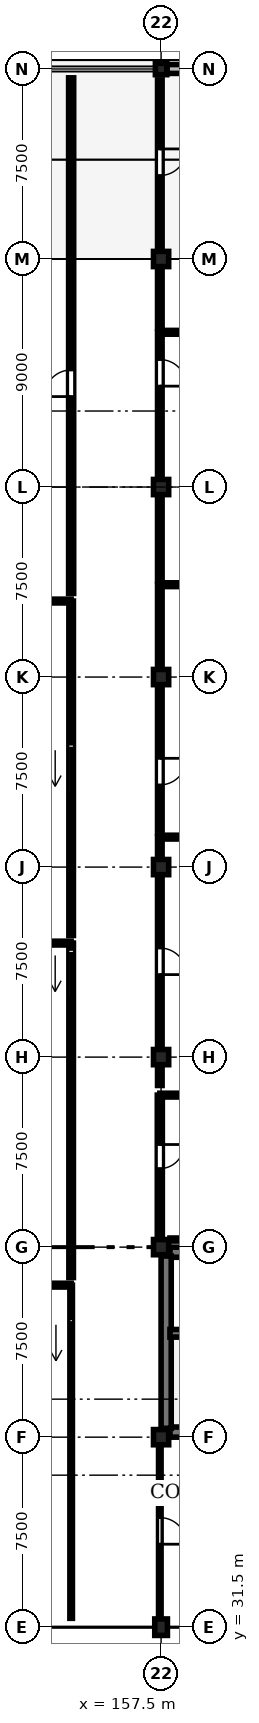
"""IFC4 building model, lengths in metres.
Left out: names, types, materials, properties, quantities, classifications, styles, units other than length and angle.
Written with IfcOpenShell. Run it as: python <this file> out.ifc"""

import sys

from ifc_helpers import new_model, si_unit, direction, frame, frame_2d, origin, origin_2d, place, context, subcontext, project, spatial, rectangle, circle, extrude, element, fill, save


model = new_model("IFC4")
c1 = context("Model", 3, precision=1e-05, world=origin(), true_north=direction((0.0, 1.0)))
c2 = subcontext(c1, "Body", "Model", "MODEL_VIEW")
j1 = project(units=[si_unit("LENGTHUNIT", "METRE"), si_unit("PLANEANGLEUNIT", "RADIAN")], contexts=[c1])
p1 = place(None, origin())
s1 = spatial("IfcSite", under=j1, at=p1, CompositionType="ELEMENT")
p2 = place(p1, origin())
s2 = spatial("IfcBuilding", under=s1, at=p2, CompositionType="ELEMENT")
p3 = place(p2, origin())
s3 = spatial("IfcBuildingStorey", under=s2, at=p3, CompositionType="ELEMENT", Elevation=0.0)
p4 = place(p3, frame((157.5, 31.5, 0.0), z_axis=(0.0, 0.0, 1.0), x_axis=(1.0, 0.0, 0.0)))
e1 = element("IfcColumn", 1, at=p4, inside=s3, PredefinedType="COLUMN", context=c2, shape_type="SweptSolid", body=[
    extrude(rectangle(XDim=0.5, YDim=0.65, at=origin_2d()), origin(), (0.0, 0.0, 1.0), 4.8),
])
p5 = place(p3, frame((157.5, 39.0, 0.0), z_axis=(0.0, 0.0, 1.0), x_axis=(1.0, 0.0, 0.0)))
e2 = element("IfcColumn", 2, at=p5, inside=s3, PredefinedType="COLUMN", context=c2, shape_type="SweptSolid", body=[
    extrude(rectangle(XDim=0.6, YDim=0.6, at=origin_2d()), origin(), (0.0, 0.0, 1.0), 4.8),
])
p6 = place(p3, frame((157.5, 46.5, 0.0), z_axis=(0.0, 0.0, 1.0), x_axis=(1.0, 0.0, 0.0)))
e3 = element("IfcColumn", 3, at=p6, inside=s3, PredefinedType="COLUMN", context=c2, shape_type="SweptSolid", body=[
    extrude(circle(Radius=0.3, at=origin_2d()), origin(), (0.0, 0.0, 1.0), 4.8),
])
for number, where, z_axis, x_axis in (
    (4, (157.5, 54.0, 0.0), (0.0, 0.0, 1.0), (1.0, 0.0, 0.0)),
    (5, (157.5, 61.5, 0.0), (0.0, 0.0, 1.0), (1.0, 0.0, 0.0)),
):
    element("IfcColumn", number, at=place(p3, frame(where, z_axis=z_axis, x_axis=x_axis)), inside=s3, PredefinedType="COLUMN", context=c2, shape_type="SweptSolid", body=[
        extrude(rectangle(XDim=0.6, YDim=0.6, at=origin_2d()), origin(), (0.0, 0.0, 1.0), 4.8),
    ])
p7 = place(p3, frame((157.5, 69.0, 0.0), z_axis=(0.0, 0.0, 1.0), x_axis=(1.0, 0.0, 0.0)))
e6 = element("IfcColumn", 6, at=p7, inside=s3, PredefinedType="COLUMN", context=c2, shape_type="SweptSolid", body=[
    extrude(circle(Radius=0.3, at=origin_2d()), origin(), (0.0, 0.0, 1.0), 4.8),
])
for number, where, z_axis, x_axis in (
    (7, (157.5, 76.5, 0.0), (0.0, 0.0, 1.0), (1.0, 0.0, 0.0)),
    (8, (157.5, 85.5, 0.0), (0.0, 0.0, 1.0), (1.0, 0.0, 0.0)),
):
    element("IfcColumn", number, at=place(p3, frame(where, z_axis=z_axis, x_axis=x_axis)), inside=s3, PredefinedType="COLUMN", context=c2, shape_type="SweptSolid", body=[
        extrude(rectangle(XDim=0.6, YDim=0.6, at=origin_2d()), origin(), (0.0, 0.0, 1.0), 4.8),
    ])
p8 = place(p3, frame((157.5, 93.0, 0.0), z_axis=(0.0, 0.0, 1.0), x_axis=(1.0, 0.0, 0.0)))
e9 = element("IfcColumn", 9, at=p8, inside=s3, PredefinedType="COLUMN", context=c2, shape_type="SweptSolid", body=[
    extrude(rectangle(XDim=0.45, YDim=0.45, at=origin_2d()), origin(), (0.0, 0.0, 1.0), 4.8),
])
p9 = place(p3, frame((157.735, 93.0, 0.0), z_axis=(0.0, 0.0, 1.0), x_axis=(1.0, 0.0, 0.0)))
e10 = element("IfcWall", 10, at=p9, inside=s3, PredefinedType="STANDARD", context=c2, shape_type="SweptSolid", body=[
    extrude(rectangle(XDim=7.03, YDim=0.35, at=frame_2d((3.515, 0.0))), origin(), (0.0, 0.0, 1.0), 4.5),
])
p10 = place(p9, frame((2.765, 0.0, 0.9)))
e11 = element("IfcOpeningElement", 11, at=p10, cuts=e10, PredefinedType="OPENING", context=c2, shape_type="SweptSolid", body=[
    extrude(rectangle(XDim=1.5, YDim=2.4, at=frame_2d((0.75, 1.2))), frame((0.0, 0.185, 0.0), z_axis=(0.0, -1.0, 0.0), x_axis=(1.0, 0.0, 0.0)), (0.0, 0.0, 1.0), 0.37),
])
p11 = place(p3, frame((157.85, 39.2, 0.0), z_axis=(0.0, 0.0, 1.0), x_axis=(1.0, 0.0, 0.0)))
e12 = element("IfcWall", 12, at=p11, inside=s3, PredefinedType="SHEAR", context=c2, shape_type="SweptSolid", body=[
    extrude(rectangle(XDim=8.05, YDim=0.4, at=frame_2d((4.025, 0.0))), origin(), (0.0, 0.0, 1.0), 4.5),
])
p12 = place(p3, frame((157.85, 46.3, 0.0), z_axis=(0.0, 0.0, 1.0), x_axis=(1.0, 0.0, 0.0)))
e13 = element("IfcWall", 13, at=p12, inside=s3, PredefinedType="SHEAR", context=c2, shape_type="SweptSolid", body=[
    extrude(rectangle(XDim=14.3, YDim=0.4, at=frame_2d((7.15, 0.0))), origin(), (0.0, 0.0, 1.0), 4.5),
])
p13 = place(p3, frame((157.7, 39.35, 0.0), z_axis=(0.0, 0.0, 1.0), x_axis=(0.0, 1.0, 0.0)))
e14 = element("IfcWall", 14, at=p13, inside=s3, PredefinedType="SHEAR", context=c2, shape_type="SweptSolid", body=[
    extrude(rectangle(XDim=6.8, YDim=0.4, at=frame_2d((3.4, 0.0))), origin(), (0.0, 0.0, 1.0), 4.5),
])
p14 = place(p3, frame((157.85, 43.1, 0.0), z_axis=(0.0, 0.0, 1.0), x_axis=(1.0, 0.0, 0.0)))
e15 = element("IfcWall", 15, at=p14, inside=s3, PredefinedType="SHEAR", context=c2, shape_type="SweptSolid", body=[
    extrude(rectangle(XDim=8.05, YDim=0.3, at=frame_2d((4.025, 0.0))), origin(), (0.0, 0.0, 1.0), 4.5),
])
p15 = place(p3, frame((153.95, 31.85, 0.0), z_axis=(0.0, 0.0, 1.0), x_axis=(0.0, 1.0, 0.0)))
e16 = element("IfcWall", 16, at=p15, inside=s3, PredefinedType="PARTITIONING", context=c2, shape_type="SweptSolid", body=[
    extrude(rectangle(XDim=13.15, YDim=0.1, at=frame_2d((6.575, 0.0))), origin(), (0.0, 0.0, 1.0), 4.485),
])
p16 = place(p15, frame((9.925, 0.0, 0.0)))
e17 = element("IfcOpeningElement", 17, at=p16, cuts=e16, PredefinedType="OPENING", context=c2, shape_type="SweptSolid", body=[
    extrude(rectangle(XDim=1.9, YDim=2.45, at=frame_2d((0.95, 1.225))), frame((0.0, 0.06, 0.0), z_axis=(0.0, -1.0, 0.0), x_axis=(1.0, 0.0, 0.0)), (0.0, 0.0, 1.0), 0.12),
])
p17 = place(p3, frame((153.95, 45.3, 0.0), z_axis=(0.0, 0.0, 1.0), x_axis=(0.0, 1.0, 0.0)))
e18 = element("IfcWall", 18, at=p17, inside=s3, PredefinedType="PARTITIONING", context=c2, shape_type="SweptSolid", body=[
    extrude(rectangle(XDim=13.2, YDim=0.18, at=frame_2d((6.6, 0.0))), origin(), (0.0, 0.0, 1.0), 4.485),
])
p18 = place(p17, frame((11.05, 0.0, 0.0)))
e19 = element("IfcOpeningElement", 19, at=p18, cuts=e18, PredefinedType="OPENING", context=c2, shape_type="SweptSolid", body=[
    extrude(rectangle(XDim=1.9, YDim=2.45, at=frame_2d((0.95, 1.225))), frame((0.0, 0.1, 0.0), z_axis=(0.0, -1.0, 0.0), x_axis=(1.0, 0.0, 0.0)), (0.0, 0.0, 1.0), 0.2),
])
p19 = place(p3, frame((153.95, 58.8, 0.0), z_axis=(0.0, 0.0, 1.0), x_axis=(0.0, 1.0, 0.0)))
e20 = element("IfcWall", 20, at=p19, inside=s3, PredefinedType="PARTITIONING", context=c2, shape_type="SweptSolid", body=[
    extrude(rectangle(XDim=13.2, YDim=0.18, at=frame_2d((6.6, 0.0))), origin(), (0.0, 0.0, 1.0), 4.485),
])
p20 = place(p19, frame((5.65, 0.0, 0.0)))
e21 = element("IfcOpeningElement", 21, at=p20, cuts=e20, PredefinedType="OPENING", context=c2, shape_type="SweptSolid", body=[
    extrude(rectangle(XDim=1.9, YDim=2.45, at=frame_2d((0.95, 1.225))), frame((0.0, 0.1, 0.0), z_axis=(0.0, -1.0, 0.0), x_axis=(1.0, 0.0, 0.0)), (0.0, 0.0, 1.0), 0.2),
])
p21 = place(p3, frame((153.95, 72.3, 0.0), z_axis=(0.0, 0.0, 1.0), x_axis=(0.0, 1.0, 0.0)))
e22 = element("IfcWall", 22, at=p21, inside=s3, PredefinedType="STANDARD", context=c2, shape_type="SweptSolid", body=[
    extrude(rectangle(XDim=20.35, YDim=0.2, at=frame_2d((10.175, 0.0))), origin(), (0.0, 0.0, 1.0), 4.085),
])
p22 = place(p21, frame((7.77, 0.0, 0.0)))
e23 = element("IfcOpeningElement", 23, at=p22, cuts=e22, PredefinedType="OPENING", context=c2, shape_type="SweptSolid", body=[
    extrude(rectangle(XDim=1.05, YDim=2.2, at=frame_2d((0.525, 1.1))), frame((0.0, 0.11, 0.0), z_axis=(0.0, -1.0, 0.0), x_axis=(1.0, 0.0, 0.0)), (0.0, 0.0, 1.0), 0.22),
])
p23 = place(p3, frame((157.45, 38.75, 0.0), z_axis=(0.0, 0.0, 1.0), x_axis=(0.0, -1.0, 0.0)))
e24 = element("IfcWall", 24, at=p23, inside=s3, PredefinedType="PARTITIONING", context=c2, shape_type="SweptSolid", body=[
    extrude(rectangle(XDim=6.9, YDim=0.1, at=frame_2d((3.45, 0.0))), origin(), (0.0, 0.0, 1.0), 3.985),
])
p24 = place(p23, frame((2.925, 0.0, 0.0)))
e25 = element("IfcOpeningElement", 25, at=p24, cuts=e24, PredefinedType="OPENING", context=c2, shape_type="SweptSolid", body=[
    extrude(rectangle(XDim=1.05, YDim=2.2, at=frame_2d((0.525, 1.1))), frame((0.0, 0.06, 0.0), z_axis=(0.0, -1.0, 0.0), x_axis=(1.0, 0.0, 0.0)), (0.0, 0.0, 1.0), 0.12),
])
p25 = place(p3, frame((157.45, 52.5, 0.0), z_axis=(0.0, 0.0, 1.0), x_axis=(0.0, -1.0, 0.0)))
e26 = element("IfcWall", 26, at=p25, inside=s3, PredefinedType="STANDARD", context=c2, shape_type="SweptSolid", body=[
    extrude(rectangle(XDim=5.7, YDim=0.2, at=frame_2d((2.85, 0.0))), origin(), (0.0, 0.0, 1.0), 3.985),
])
p26 = place(p25, frame((1.95, 0.0, 0.0)))
e27 = element("IfcOpeningElement", 27, at=p26, cuts=e26, PredefinedType="OPENING", context=c2, shape_type="SweptSolid", body=[
    extrude(rectangle(XDim=0.95, YDim=2.15, at=frame_2d((0.475, 1.075))), frame((0.0, 0.11, 0.0), z_axis=(0.0, -1.0, 0.0), x_axis=(1.0, 0.0, 0.0)), (0.0, 0.0, 1.0), 0.22),
])
p27 = place(p3, frame((157.45, 62.683, 0.0), z_axis=(0.0, 0.0, 1.0), x_axis=(0.0, -1.0, 0.0)))
e28 = element("IfcWall", 28, at=p27, inside=s3, PredefinedType="PARTITIONING", context=c2, shape_type="SweptSolid", body=[
    extrude(rectangle(XDim=9.803, YDim=0.18, at=frame_2d((4.901, 0.0))), origin(), (0.0, 0.0, 1.0), 3.935),
])
p28 = place(p27, frame((4.376, 0.0, 0.0)))
e29 = element("IfcOpeningElement", 29, at=p28, cuts=e28, PredefinedType="OPENING", context=c2, shape_type="SweptSolid", body=[
    extrude(rectangle(XDim=1.05, YDim=2.2, at=frame_2d((0.525, 1.1))), frame((0.0, 0.1, 0.0), z_axis=(0.0, -1.0, 0.0), x_axis=(1.0, 0.0, 0.0)), (0.0, 0.0, 1.0), 0.2),
])
p29 = place(p3, frame((157.45, 72.645, 0.0), z_axis=(0.0, 0.0, 1.0), x_axis=(0.0, -1.0, 0.0)))
e30 = element("IfcWall", 30, at=p29, inside=s3, PredefinedType="PARTITIONING", context=c2, shape_type="SweptSolid", body=[
    extrude(rectangle(XDim=9.802, YDim=0.18, at=frame_2d((4.901, 0.0))), origin(), (0.0, 0.0, 1.0), 3.935),
])
p30 = place(p29, frame((6.852, 0.0, 0.0)))
e31 = element("IfcOpeningElement", 31, at=p30, cuts=e30, PredefinedType="OPENING", context=c2, shape_type="SweptSolid", body=[
    extrude(rectangle(XDim=1.05, YDim=2.2, at=frame_2d((0.525, 1.1))), frame((0.0, 0.1, 0.0), z_axis=(0.0, -1.0, 0.0), x_axis=(1.0, 0.0, 0.0)), (0.0, 0.0, 1.0), 0.2),
])
p31 = place(p3, frame((157.45, 82.607, 0.0), z_axis=(0.0, 0.0, 1.0), x_axis=(0.0, -1.0, 0.0)))
e32 = element("IfcWall", 32, at=p31, inside=s3, PredefinedType="PARTITIONING", context=c2, shape_type="SweptSolid", body=[
    extrude(rectangle(XDim=9.802, YDim=0.18, at=frame_2d((4.901, 0.0))), origin(), (0.0, 0.0, 1.0), 3.785),
])
p32 = place(p31, frame((1.075, 0.0, 0.0)))
e33 = element("IfcOpeningElement", 33, at=p32, cuts=e32, PredefinedType="OPENING", context=c2, shape_type="SweptSolid", body=[
    extrude(rectangle(XDim=1.05, YDim=2.2, at=frame_2d((0.525, 1.1))), frame((0.0, 0.1, 0.0), z_axis=(0.0, -1.0, 0.0), x_axis=(1.0, 0.0, 0.0)), (0.0, 0.0, 1.0), 0.2),
])
p33 = place(p3, frame((157.45, 92.57, 0.0), z_axis=(0.0, 0.0, 1.0), x_axis=(0.0, -1.0, 0.0)))
e34 = element("IfcWall", 34, at=p33, inside=s3, PredefinedType="PARTITIONING", context=c2, shape_type="SweptSolid", body=[
    extrude(rectangle(XDim=9.802, YDim=0.18, at=frame_2d((4.901, 0.0))), origin(), (0.0, 0.0, 1.0), 3.785),
])
p34 = place(p33, frame((2.726, 0.0, 0.0)))
e35 = element("IfcOpeningElement", 35, at=p34, cuts=e34, PredefinedType="OPENING", context=c2, shape_type="SweptSolid", body=[
    extrude(rectangle(XDim=1.05, YDim=2.2, at=frame_2d((0.525, 1.1))), frame((0.0, 0.1, 0.0), z_axis=(0.0, -1.0, 0.0), x_axis=(1.0, 0.0, 0.0)), (0.0, 0.0, 1.0), 0.2),
])
p35 = place(p3, frame((142.85, 45.0, 0.0), z_axis=(0.0, 0.0, 1.0), x_axis=(1.0, 0.0, 0.0)))
e36 = element("IfcWall", 36, at=p35, inside=s3, PredefinedType="PARTITIONING", context=c2, shape_type="SweptSolid", body=[
    extrude(rectangle(XDim=11.1, YDim=0.15, at=frame_2d((5.55, 0.0))), origin(), (0.0, 0.0, 1.0), 4.485),
])
p36 = place(p3, frame((143.65, 58.5, 0.0), z_axis=(0.0, 0.0, 1.0), x_axis=(1.0, 0.0, 0.0)))
e37 = element("IfcWall", 37, at=p36, inside=s3, PredefinedType="PARTITIONING", context=c2, shape_type="SweptSolid", body=[
    extrude(rectangle(XDim=10.3, YDim=0.15, at=frame_2d((5.15, 0.0))), origin(), (0.0, 0.0, 1.0), 4.485),
])
p37 = place(p3, frame((142.85, 72.0, 0.0), z_axis=(0.0, 0.0, 1.0), x_axis=(1.0, 0.0, 0.0)))
e38 = element("IfcWall", 38, at=p37, inside=s3, PredefinedType="PARTITIONING", context=c2, shape_type="SweptSolid", body=[
    extrude(rectangle(XDim=11.1, YDim=0.15, at=frame_2d((5.55, 0.0))), origin(), (0.0, 0.0, 1.0), 4.485),
])
for number, where, z_axis, x_axis in (
    (39, (157.45, 52.5, 0.0), (0.0, 0.0, 1.0), (1.0, 0.0, 0.0)),
    (40, (157.45, 62.683, 0.0), (0.0, 0.0, 1.0), (1.0, 0.0, 0.0)),
    (41, (157.45, 72.645, 0.0), (0.0, 0.0, 1.0), (1.0, 0.0, 0.0)),
    (42, (157.45, 82.607, 0.0), (0.0, 0.0, 1.0), (1.0, 0.0, 0.0)),
):
    element("IfcWall", number, at=place(p3, frame(where, z_axis=z_axis, x_axis=x_axis)), inside=s3, PredefinedType="PARTITIONING", context=c2, shape_type="SweptSolid", body=[
        extrude(rectangle(XDim=14.7, YDim=0.15, at=frame_2d((7.35, 0.0))), origin(), (0.0, 0.0, 1.0), 4.485),
    ])
p38 = place(p3, frame((157.85, 46.8, 0.0), z_axis=(0.0, 0.0, 1.0), x_axis=(1.0, 0.0, 0.0)))
e43 = element("IfcWall", 43, at=p38, inside=s3, PredefinedType="PARTITIONING", context=c2, shape_type="SweptSolid", body=[
    extrude(rectangle(XDim=14.3, YDim=0.12, at=frame_2d((7.15, 0.0))), origin(), (0.0, 0.0, 1.0), 3.835),
])
p39 = place(p16, origin())
e44 = element("IfcDoor", 44, at=p39, inside=s3, OperationType="DOUBLE_DOOR_SLIDING", PredefinedType="DOOR", context=c2, shape_type="SweptSolid", body=[
    extrude(rectangle(XDim=1.9, YDim=2.45, at=frame_2d((0.95, 1.225))), frame((0.0, 0.025, 0.0), z_axis=(0.0, -1.0, 0.0), x_axis=(1.0, 0.0, 0.0)), (0.0, 0.0, 1.0), 0.05),
])
fill(e17, e44)
p40 = place(p18, origin())
e45 = element("IfcDoor", 45, at=p40, inside=s3, OperationType="DOUBLE_DOOR_SLIDING", PredefinedType="DOOR", context=c2, shape_type="SweptSolid", body=[
    extrude(rectangle(XDim=1.9, YDim=2.45, at=frame_2d((0.95, 1.225))), frame((0.0, 0.025, 0.0), z_axis=(0.0, -1.0, 0.0), x_axis=(1.0, 0.0, 0.0)), (0.0, 0.0, 1.0), 0.05),
])
fill(e19, e45)
p41 = place(p20, origin())
e46 = element("IfcDoor", 46, at=p41, inside=s3, OperationType="DOUBLE_DOOR_SLIDING", PredefinedType="DOOR", context=c2, shape_type="SweptSolid", body=[
    extrude(rectangle(XDim=1.9, YDim=2.45, at=frame_2d((0.95, 1.225))), frame((0.0, 0.025, 0.0), z_axis=(0.0, -1.0, 0.0), x_axis=(1.0, 0.0, 0.0)), (0.0, 0.0, 1.0), 0.05),
])
fill(e21, e46)
p42 = place(p22, origin())
e47 = element("IfcDoor", 47, at=p42, inside=s3, OperationType="SINGLE_SWING_LEFT", PredefinedType="DOOR", context=c2, shape_type="SweptSolid", body=[
    extrude(rectangle(XDim=1.05, YDim=2.2, at=frame_2d((0.525, 1.1))), frame((0.0, 0.025, 0.0), z_axis=(0.0, -1.0, 0.0), x_axis=(1.0, 0.0, 0.0)), (0.0, 0.0, 1.0), 0.05),
])
fill(e23, e47)
p43 = place(p24, origin())
e48 = element("IfcDoor", 48, at=p43, inside=s3, OperationType="SINGLE_SWING_RIGHT", PredefinedType="DOOR", context=c2, shape_type="SweptSolid", body=[
    extrude(rectangle(XDim=1.05, YDim=2.2, at=frame_2d((0.525, 1.1))), frame((0.0, 0.025, 0.0), z_axis=(0.0, -1.0, 0.0), x_axis=(1.0, 0.0, 0.0)), (0.0, 0.0, 1.0), 0.05),
])
fill(e25, e48)
p44 = place(p26, origin())
e49 = element("IfcDoor", 49, at=p44, inside=s3, OperationType="SINGLE_SWING_LEFT", PredefinedType="DOOR", context=c2, shape_type="SweptSolid", body=[
    extrude(rectangle(XDim=0.95, YDim=2.15, at=frame_2d((0.475, 1.075))), frame((0.0, 0.025, 0.0), z_axis=(0.0, -1.0, 0.0), x_axis=(1.0, 0.0, 0.0)), (0.0, 0.0, 1.0), 0.05),
])
fill(e27, e49)
p45 = place(p28, origin())
e50 = element("IfcDoor", 50, at=p45, inside=s3, OperationType="SINGLE_SWING_RIGHT", PredefinedType="DOOR", context=c2, shape_type="SweptSolid", body=[
    extrude(rectangle(XDim=1.05, YDim=2.2, at=frame_2d((0.525, 1.1))), frame((0.0, 0.025, 0.0), z_axis=(0.0, -1.0, 0.0), x_axis=(1.0, 0.0, 0.0)), (0.0, 0.0, 1.0), 0.05),
])
fill(e29, e50)
p46 = place(p30, origin())
e51 = element("IfcDoor", 51, at=p46, inside=s3, OperationType="SINGLE_SWING_LEFT", PredefinedType="DOOR", context=c2, shape_type="SweptSolid", body=[
    extrude(rectangle(XDim=1.05, YDim=2.2, at=frame_2d((0.525, 1.1))), frame((0.0, 0.025, 0.0), z_axis=(0.0, -1.0, 0.0), x_axis=(1.0, 0.0, 0.0)), (0.0, 0.0, 1.0), 0.05),
])
fill(e31, e51)
p47 = place(p32, origin())
e52 = element("IfcDoor", 52, at=p47, inside=s3, OperationType="SINGLE_SWING_RIGHT", PredefinedType="DOOR", context=c2, shape_type="SweptSolid", body=[
    extrude(rectangle(XDim=1.05, YDim=2.2, at=frame_2d((0.525, 1.1))), frame((0.0, 0.025, 0.0), z_axis=(0.0, -1.0, 0.0), x_axis=(1.0, 0.0, 0.0)), (0.0, 0.0, 1.0), 0.05),
])
fill(e33, e52)
p48 = place(p34, origin())
e53 = element("IfcDoor", 53, at=p48, inside=s3, OperationType="SINGLE_SWING_LEFT", PredefinedType="DOOR", context=c2, shape_type="SweptSolid", body=[
    extrude(rectangle(XDim=1.05, YDim=2.2, at=frame_2d((0.525, 1.1))), frame((0.0, 0.025, 0.0), z_axis=(0.0, -1.0, 0.0), x_axis=(1.0, 0.0, 0.0)), (0.0, 0.0, 1.0), 0.05),
])
fill(e35, e53)
save(model, sys.argv[1])
